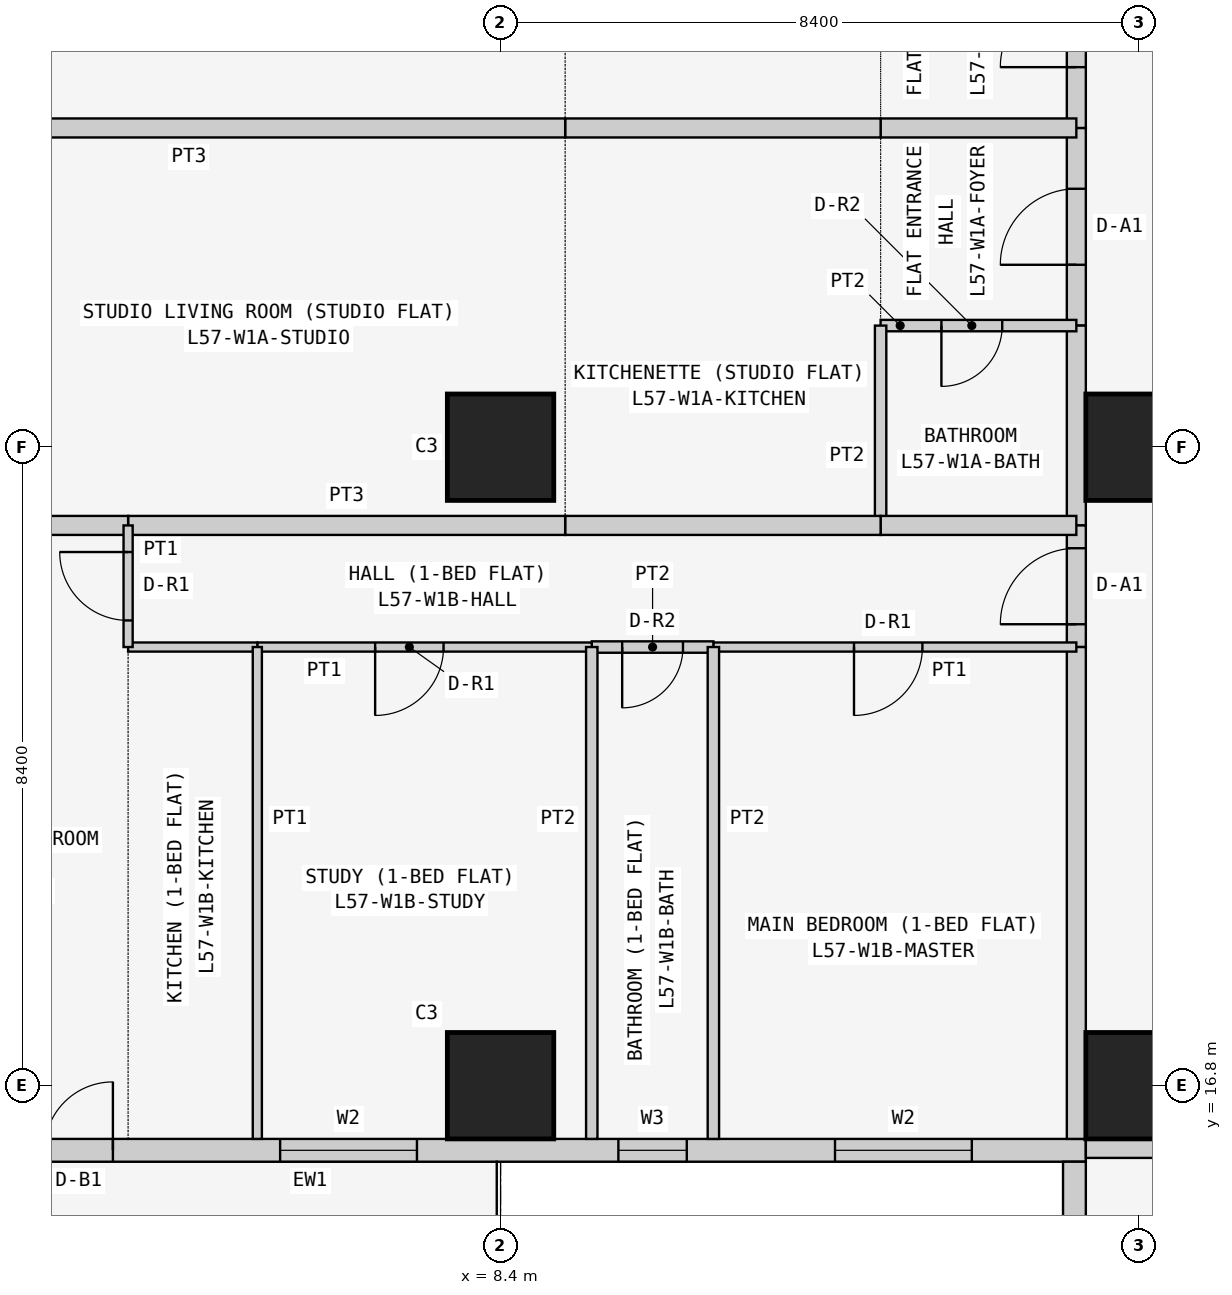
"""IFC4 building model, lengths in metres.
Left out: names, types, materials, properties, quantities, classifications, styles, units other than length and angle.
Written with IfcOpenShell. Run it as: python <this file> out.ifc"""

import sys

from ifc_helpers import new_model, si_unit, direction, frame, frame_2d, origin, origin_2d, place, context, subcontext, project, spatial, rectangle, extrude, element, fill, save


model = new_model("IFC4")
c1 = context("Model", 3, precision=1e-05, world=origin(), true_north=direction((0.0, 1.0)))
c2 = subcontext(c1, "Body", "Model", "MODEL_VIEW")
j1 = project(units=[si_unit("LENGTHUNIT", "METRE"), si_unit("PLANEANGLEUNIT", "RADIAN")], contexts=[c1])
p1 = place(None, origin())
s1 = spatial("IfcSite", under=j1, at=p1, CompositionType="ELEMENT")
p2 = place(p1, origin())
s2 = spatial("IfcBuilding", under=s1, at=p2, CompositionType="ELEMENT")
p3 = place(p2, frame((0.0, 0.0, 219.3)))
s3 = spatial("IfcBuildingStorey", under=s2, at=p3, CompositionType="ELEMENT", Elevation=219.3)
for number, where, z_axis, x_axis in (
    (1, (8.4, 16.8, 0.0), (0.0, 0.0, 1.0), (1.0, 0.0, 0.0)),
    (2, (8.4, 25.2, 0.0), (0.0, 0.0, 1.0), (1.0, 0.0, 0.0)),
    (3, (16.8, 16.8, 0.0), (0.0, 0.0, 1.0), (1.0, 0.0, 0.0)),
    (4, (16.8, 25.2, 0.0), (0.0, 0.0, 1.0), (1.0, 0.0, 0.0)),
):
    element("IfcColumn", number, at=place(p3, frame(where, z_axis=z_axis, x_axis=x_axis)), inside=s3, PredefinedType="COLUMN", context=c2, shape_type="SweptSolid", body=[
        extrude(rectangle(XDim=1.4, YDim=1.4, at=origin_2d()), origin(), (0.0, 0.0, 1.0), 3.6),
    ])
p4 = place(p3, frame((0.4, 15.95, 0.0), z_axis=(0.0, 0.0, 1.0), x_axis=(1.0, 0.0, 0.0)))
e5 = element("IfcWall", 5, at=p4, inside=s3, PredefinedType="SOLIDWALL", context=c2, shape_type="SweptSolid", body=[
    extrude(rectangle(XDim=15.7, YDim=0.3, at=frame_2d((7.85, 0.0))), origin(), (0.0, 0.0, 1.0), 3.45),
])
p5 = place(p4, frame((12.4, 0.0, 0.9)))
e6 = element("IfcOpeningElement", 6, at=p5, cuts=e5, PredefinedType="OPENING", context=c2, shape_type="SweptSolid", body=[
    extrude(rectangle(XDim=1.8, YDim=1.5, at=frame_2d((0.9, 0.75))), frame((0.0, 0.16, 0.0), z_axis=(0.0, -1.0, 0.0), x_axis=(1.0, 0.0, 0.0)), (0.0, 0.0, 1.0), 0.32),
])
p6 = place(p4, frame((9.55, 0.0, 1.5)))
e7 = element("IfcOpeningElement", 7, at=p6, cuts=e5, PredefinedType="OPENING", context=c2, shape_type="SweptSolid", body=[
    extrude(rectangle(XDim=0.9, YDim=0.7, at=frame_2d((0.45, 0.35))), frame((0.0, 0.16, 0.0), z_axis=(0.0, -1.0, 0.0), x_axis=(1.0, 0.0, 0.0)), (0.0, 0.0, 1.0), 0.32),
])
p7 = place(p4, frame((5.1, 0.0, 0.9)))
e8 = element("IfcOpeningElement", 8, at=p7, cuts=e5, PredefinedType="OPENING", context=c2, shape_type="SweptSolid", body=[
    extrude(rectangle(XDim=1.8, YDim=1.5, at=frame_2d((0.9, 0.75))), frame((0.0, 0.16, 0.0), z_axis=(0.0, -1.0, 0.0), x_axis=(1.0, 0.0, 0.0)), (0.0, 0.0, 1.0), 0.32),
])
p8 = place(p4, frame((2.0, 0.0, 0.0)))
e9 = element("IfcOpeningElement", 9, at=p8, cuts=e5, PredefinedType="OPENING", context=c2, shape_type="SweptSolid", body=[
    extrude(rectangle(XDim=0.9, YDim=2.4, at=frame_2d((0.45, 1.2))), frame((0.0, 0.16, 0.0), z_axis=(0.0, -1.0, 0.0), x_axis=(1.0, 0.0, 0.0)), (0.0, 0.0, 1.0), 0.32),
])
p9 = place(p4, frame((0.7, 0.0, 0.9)))
e10 = element("IfcOpeningElement", 10, at=p9, cuts=e5, PredefinedType="OPENING", context=c2, shape_type="SweptSolid", body=[
    extrude(rectangle(XDim=1.2, YDim=1.5, at=frame_2d((0.6, 0.75))), frame((0.0, 0.16, 0.0), z_axis=(0.0, -1.0, 0.0), x_axis=(1.0, 0.0, 0.0)), (0.0, 0.0, 1.0), 0.32),
])
p10 = place(p3, frame((15.95, 15.8, 0.0), z_axis=(0.0, 0.0, 1.0), x_axis=(0.0, -1.0, 0.0)))
e11 = element("IfcWall", 11, at=p10, inside=s3, PredefinedType="SOLIDWALL", context=c2, shape_type="SweptSolid", body=[
    extrude(rectangle(XDim=7.0, YDim=0.3, at=frame_2d((3.5, 0.0))), origin(), (0.0, 0.0, 1.0), 3.45),
])
p11 = place(p10, frame((1.5, 0.0, 0.9)))
e12 = element("IfcOpeningElement", 12, at=p11, cuts=e11, PredefinedType="OPENING", context=c2, shape_type="SweptSolid", body=[
    extrude(rectangle(XDim=2.4, YDim=1.5, at=frame_2d((1.2, 0.75))), frame((0.0, 0.16, 0.0), z_axis=(0.0, -1.0, 0.0), x_axis=(1.0, 0.0, 0.0)), (0.0, 0.0, 1.0), 0.32),
])
p12 = place(p10, frame((5.05, 0.0, 0.9)))
e13 = element("IfcOpeningElement", 13, at=p12, cuts=e11, PredefinedType="OPENING", context=c2, shape_type="SweptSolid", body=[
    extrude(rectangle(XDim=1.2, YDim=1.5, at=frame_2d((0.6, 0.75))), frame((0.0, 0.16, 0.0), z_axis=(0.0, -1.0, 0.0), x_axis=(1.0, 0.0, 0.0)), (0.0, 0.0, 1.0), 0.32),
])
p13 = place(p3, frame((22.971, 15.975, 0.0), z_axis=(0.0, 0.0, 1.0), x_axis=(-1.0, 0.0, 0.0)))
e14 = element("IfcWall", 14, at=p13, inside=s3, PredefinedType="PARTITIONING", context=c2, shape_type="SweptSolid", body=[
    extrude(rectangle(XDim=6.871, YDim=0.25, at=frame_2d((3.436, 0.0))), origin(), (0.0, 0.0, 1.0), 3.45),
])
p14 = place(p3, frame((15.975, 26.8, 0.0), z_axis=(0.0, 0.0, 1.0), x_axis=(0.0, 1.0, 0.0)))
e15 = element("IfcWall", 15, at=p14, inside=s3, PredefinedType="PARTITIONING", context=c2, shape_type="SweptSolid", body=[
    extrude(rectangle(XDim=2.6, YDim=0.25, at=frame_2d((1.3, 0.0))), origin(), (0.0, 0.0, 1.0), 3.45),
])
p15 = place(p14, frame((0.8, 0.0, 0.0)))
e16 = element("IfcOpeningElement", 16, at=p15, cuts=e15, PredefinedType="OPENING", context=c2, shape_type="SweptSolid", body=[
    extrude(rectangle(XDim=1.0, YDim=2.1, at=frame_2d((0.5, 1.05))), frame((0.0, 0.135, 0.0), z_axis=(0.0, -1.0, 0.0), x_axis=(1.0, 0.0, 0.0)), (0.0, 0.0, 1.0), 0.27),
])
p16 = place(p3, frame((15.975, 24.171, 0.0), z_axis=(0.0, 0.0, 1.0), x_axis=(0.0, 1.0, 0.0)))
e17 = element("IfcWall", 17, at=p16, inside=s3, PredefinedType="PARTITIONING", context=c2, shape_type="SweptSolid", body=[
    extrude(rectangle(XDim=2.629, YDim=0.25, at=frame_2d((1.314, 0.0))), origin(), (0.0, 0.0, 1.0), 3.45),
])
p17 = place(p3, frame((15.975, 22.571, 0.0), z_axis=(0.0, 0.0, 1.0), x_axis=(0.0, 1.0, 0.0)))
e18 = element("IfcWall", 18, at=p17, inside=s3, PredefinedType="PARTITIONING", context=c2, shape_type="SweptSolid", body=[
    extrude(rectangle(XDim=1.6, YDim=0.25, at=frame_2d((0.8, 0.0))), origin(), (0.0, 0.0, 1.0), 3.45),
])
p18 = place(p17, frame((0.3, 0.0, 0.0)))
e19 = element("IfcOpeningElement", 19, at=p18, cuts=e18, PredefinedType="OPENING", context=c2, shape_type="SweptSolid", body=[
    extrude(rectangle(XDim=1.0, YDim=2.1, at=frame_2d((0.5, 1.05))), frame((0.0, 0.135, 0.0), z_axis=(0.0, -1.0, 0.0), x_axis=(1.0, 0.0, 0.0)), (0.0, 0.0, 1.0), 0.27),
])
p19 = place(p3, frame((15.975, 16.1, 0.0), z_axis=(0.0, 0.0, 1.0), x_axis=(0.0, 1.0, 0.0)))
e20 = element("IfcWall", 20, at=p19, inside=s3, PredefinedType="PARTITIONING", context=c2, shape_type="SweptSolid", body=[
    extrude(rectangle(XDim=6.471, YDim=0.25, at=frame_2d((3.235, 0.0))), origin(), (0.0, 0.0, 1.0), 3.45),
])
p20 = place(p3, frame((15.975, 29.4, 0.0), z_axis=(0.0, 0.0, 1.0), x_axis=(0.0, 1.0, 0.0)))
e21 = element("IfcWall", 21, at=p20, inside=s3, PredefinedType="PARTITIONING", context=c2, shape_type="SweptSolid", body=[
    extrude(rectangle(XDim=2.6, YDim=0.25, at=frame_2d((1.3, 0.0))), origin(), (0.0, 0.0, 1.0), 3.45),
])
p21 = place(p20, frame((0.8, 0.0, 0.0)))
e22 = element("IfcOpeningElement", 22, at=p21, cuts=e21, PredefinedType="OPENING", context=c2, shape_type="SweptSolid", body=[
    extrude(rectangle(XDim=1.0, YDim=2.1, at=frame_2d((0.5, 1.05))), frame((0.0, 0.135, 0.0), z_axis=(0.0, -1.0, 0.0), x_axis=(1.0, 0.0, 0.0)), (0.0, 0.0, 1.0), 0.27),
])
p22 = place(p3, frame((13.4, 26.8, 0.0), z_axis=(0.0, 0.0, 1.0), x_axis=(1.0, 0.0, 0.0)))
e23 = element("IfcWall", 23, at=p22, inside=s3, PredefinedType="PARTITIONING", context=c2, shape_type="SweptSolid", body=[
    extrude(rectangle(XDim=2.575, YDim=0.15, at=frame_2d((1.288, 0.0))), origin(), (0.0, 0.0, 1.0), 3.45),
])
p23 = place(p22, frame((0.8, 0.0, 0.0)))
e24 = element("IfcOpeningElement", 24, at=p23, cuts=e23, PredefinedType="OPENING", context=c2, shape_type="SweptSolid", body=[
    extrude(rectangle(XDim=0.8, YDim=2.1, at=frame_2d((0.4, 1.05))), frame((0.0, 0.085, 0.0), z_axis=(0.0, -1.0, 0.0), x_axis=(1.0, 0.0, 0.0)), (0.0, 0.0, 1.0), 0.17),
])
p24 = place(p3, frame((15.975, 29.4, 0.0), z_axis=(0.0, 0.0, 1.0), x_axis=(-1.0, 0.0, 0.0)))
e25 = element("IfcWall", 25, at=p24, inside=s3, PredefinedType="PARTITIONING", context=c2, shape_type="SweptSolid", body=[
    extrude(rectangle(XDim=2.575, YDim=0.25, at=frame_2d((1.288, 0.0))), origin(), (0.0, 0.0, 1.0), 3.45),
])
p25 = place(p3, frame((13.4, 26.8, 0.0), z_axis=(0.0, 0.0, 1.0), x_axis=(0.0, -1.0, 0.0)))
e26 = element("IfcWall", 26, at=p25, inside=s3, PredefinedType="PARTITIONING", context=c2, shape_type="SweptSolid", body=[
    extrude(rectangle(XDim=2.629, YDim=0.15, at=frame_2d((1.314, 0.0))), origin(), (0.0, 0.0, 1.0), 3.45),
])
p26 = place(p3, frame((13.4, 24.171, 0.0), z_axis=(0.0, 0.0, 1.0), x_axis=(1.0, 0.0, 0.0)))
e27 = element("IfcWall", 27, at=p26, inside=s3, PredefinedType="PARTITIONING", context=c2, shape_type="SweptSolid", body=[
    extrude(rectangle(XDim=2.575, YDim=0.25, at=frame_2d((1.288, 0.0))), origin(), (0.0, 0.0, 1.0), 3.45),
])
for number, where, z_axis, x_axis in (
    (28, (9.25, 24.171, 0.0), (0.0, 0.0, 1.0), (1.0, 0.0, 0.0)),
    (29, (13.4, 29.4, 0.0), (0.0, 0.0, 1.0), (-1.0, 0.0, 0.0)),
):
    element("IfcWall", number, at=place(p3, frame(where, z_axis=z_axis, x_axis=x_axis)), inside=s3, PredefinedType="PARTITIONING", context=c2, shape_type="SweptSolid", body=[
        extrude(rectangle(XDim=4.15, YDim=0.25, at=frame_2d((2.075, 0.0))), origin(), (0.0, 0.0, 1.0), 3.45),
    ])
p27 = place(p3, frame((3.5, 24.171, 0.0), z_axis=(0.0, 0.0, 1.0), x_axis=(1.0, 0.0, 0.0)))
e30 = element("IfcWall", 30, at=p27, inside=s3, PredefinedType="PARTITIONING", context=c2, shape_type="SweptSolid", body=[
    extrude(rectangle(XDim=5.75, YDim=0.25, at=frame_2d((2.875, 0.0))), origin(), (0.0, 0.0, 1.0), 3.45),
])
p28 = place(p3, frame((-0.65, 24.171, 0.0), z_axis=(0.0, 0.0, 1.0), x_axis=(1.0, 0.0, 0.0)))
e31 = element("IfcWall", 31, at=p28, inside=s3, PredefinedType="PARTITIONING", context=c2, shape_type="SweptSolid", body=[
    extrude(rectangle(XDim=4.15, YDim=0.25, at=frame_2d((2.075, 0.0))), origin(), (0.0, 0.0, 1.0), 3.45),
])
p29 = place(p3, frame((9.25, 29.4, 0.0), z_axis=(0.0, 0.0, 1.0), x_axis=(-1.0, 0.0, 0.0)))
e32 = element("IfcWall", 32, at=p29, inside=s3, PredefinedType="PARTITIONING", context=c2, shape_type="SweptSolid", body=[
    extrude(rectangle(XDim=9.9, YDim=0.25, at=frame_2d((4.95, 0.0))), origin(), (0.0, 0.0, 1.0), 3.45),
])
p30 = place(p3, frame((11.2, 22.571, 0.0), z_axis=(0.0, 0.0, 1.0), x_axis=(1.0, 0.0, 0.0)))
e33 = element("IfcWall", 33, at=p30, inside=s3, PredefinedType="PARTITIONING", context=c2, shape_type="SweptSolid", body=[
    extrude(rectangle(XDim=4.775, YDim=0.12, at=frame_2d((2.388, 0.0))), origin(), (0.0, 0.0, 1.0), 3.45),
])
p31 = place(p30, frame((1.85, 0.0, 0.0)))
e34 = element("IfcOpeningElement", 34, at=p31, cuts=e33, PredefinedType="OPENING", context=c2, shape_type="SweptSolid", body=[
    extrude(rectangle(XDim=0.9, YDim=2.1, at=frame_2d((0.45, 1.05))), frame((0.0, 0.07, 0.0), z_axis=(0.0, -1.0, 0.0), x_axis=(1.0, 0.0, 0.0)), (0.0, 0.0, 1.0), 0.14),
])
p32 = place(p3, frame((9.6, 22.571, 0.0), z_axis=(0.0, 0.0, 1.0), x_axis=(1.0, 0.0, 0.0)))
e35 = element("IfcWall", 35, at=p32, inside=s3, PredefinedType="PARTITIONING", context=c2, shape_type="SweptSolid", body=[
    extrude(rectangle(XDim=1.6, YDim=0.15, at=frame_2d((0.8, 0.0))), origin(), (0.0, 0.0, 1.0), 3.45),
])
p33 = place(p32, frame((0.4, 0.0, 0.0)))
e36 = element("IfcOpeningElement", 36, at=p33, cuts=e35, PredefinedType="OPENING", context=c2, shape_type="SweptSolid", body=[
    extrude(rectangle(XDim=0.8, YDim=2.1, at=frame_2d((0.4, 1.05))), frame((0.0, 0.085, 0.0), z_axis=(0.0, -1.0, 0.0), x_axis=(1.0, 0.0, 0.0)), (0.0, 0.0, 1.0), 0.17),
])
p34 = place(p3, frame((5.2, 22.571, 0.0), z_axis=(0.0, 0.0, 1.0), x_axis=(1.0, 0.0, 0.0)))
e37 = element("IfcWall", 37, at=p34, inside=s3, PredefinedType="PARTITIONING", context=c2, shape_type="SweptSolid", body=[
    extrude(rectangle(XDim=4.4, YDim=0.12, at=frame_2d((2.2, 0.0))), origin(), (0.0, 0.0, 1.0), 3.45),
])
p35 = place(p34, frame((1.55, 0.0, 0.0)))
e38 = element("IfcOpeningElement", 38, at=p35, cuts=e37, PredefinedType="OPENING", context=c2, shape_type="SweptSolid", body=[
    extrude(rectangle(XDim=0.9, YDim=2.1, at=frame_2d((0.45, 1.05))), frame((0.0, 0.07, 0.0), z_axis=(0.0, -1.0, 0.0), x_axis=(1.0, 0.0, 0.0)), (0.0, 0.0, 1.0), 0.14),
])
p36 = place(p3, frame((3.5, 22.571, 0.0), z_axis=(0.0, 0.0, 1.0), x_axis=(1.0, 0.0, 0.0)))
e39 = element("IfcWall", 39, at=p36, inside=s3, PredefinedType="PARTITIONING", context=c2, shape_type="SweptSolid", body=[
    extrude(rectangle(XDim=1.7, YDim=0.12, at=frame_2d((0.85, 0.0))), origin(), (0.0, 0.0, 1.0), 3.45),
])
p37 = place(p3, frame((3.5, 24.171, 0.0), z_axis=(0.0, 0.0, 1.0), x_axis=(0.0, -1.0, 0.0)))
e40 = element("IfcWall", 40, at=p37, inside=s3, PredefinedType="PARTITIONING", context=c2, shape_type="SweptSolid", body=[
    extrude(rectangle(XDim=1.6, YDim=0.12, at=frame_2d((0.8, 0.0))), origin(), (0.0, 0.0, 1.0), 3.45),
])
p38 = place(p37, frame((0.35, 0.0, 0.0)))
e41 = element("IfcOpeningElement", 41, at=p38, cuts=e40, PredefinedType="OPENING", context=c2, shape_type="SweptSolid", body=[
    extrude(rectangle(XDim=0.9, YDim=2.1, at=frame_2d((0.45, 1.05))), frame((0.0, 0.07, 0.0), z_axis=(0.0, -1.0, 0.0), x_axis=(1.0, 0.0, 0.0)), (0.0, 0.0, 1.0), 0.14),
])
for number, where, z_axis, x_axis in (
    (42, (11.2, 22.571, 0.0), (0.0, 0.0, 1.0), (0.0, -1.0, 0.0)),
    (43, (9.6, 22.571, 0.0), (0.0, 0.0, 1.0), (0.0, -1.0, 0.0)),
):
    element("IfcWall", number, at=place(p3, frame(where, z_axis=z_axis, x_axis=x_axis)), inside=s3, PredefinedType="PARTITIONING", context=c2, shape_type="SweptSolid", body=[
        extrude(rectangle(XDim=6.471, YDim=0.15, at=frame_2d((3.235, 0.0))), origin(), (0.0, 0.0, 1.0), 3.45),
    ])
p39 = place(p3, frame((5.2, 22.571, 0.0), z_axis=(0.0, 0.0, 1.0), x_axis=(0.0, -1.0, 0.0)))
e44 = element("IfcWall", 44, at=p39, inside=s3, PredefinedType="PARTITIONING", context=c2, shape_type="SweptSolid", body=[
    extrude(rectangle(XDim=6.471, YDim=0.12, at=frame_2d((3.235, 0.0))), origin(), (0.0, 0.0, 1.0), 3.45),
])
p40 = place(p5, origin())
e45 = element("IfcWindow", 45, at=p40, inside=s3, PartitioningType="SINGLE_PANEL", PredefinedType="WINDOW", context=c2, shape_type="SweptSolid", body=[
    extrude(rectangle(XDim=1.8, YDim=1.5, at=frame_2d((0.9, 0.75))), frame((0.0, 0.03, 0.0), z_axis=(0.0, -1.0, 0.0), x_axis=(1.0, 0.0, 0.0)), (0.0, 0.0, 1.0), 0.06),
])
fill(e6, e45)
p41 = place(p6, origin())
e46 = element("IfcWindow", 46, at=p41, inside=s3, PartitioningType="SINGLE_PANEL", PredefinedType="WINDOW", context=c2, shape_type="SweptSolid", body=[
    extrude(rectangle(XDim=0.9, YDim=0.7, at=frame_2d((0.45, 0.35))), frame((0.0, 0.03, 0.0), z_axis=(0.0, -1.0, 0.0), x_axis=(1.0, 0.0, 0.0)), (0.0, 0.0, 1.0), 0.06),
])
fill(e7, e46)
p42 = place(p7, origin())
e47 = element("IfcWindow", 47, at=p42, inside=s3, PartitioningType="SINGLE_PANEL", PredefinedType="WINDOW", context=c2, shape_type="SweptSolid", body=[
    extrude(rectangle(XDim=1.8, YDim=1.5, at=frame_2d((0.9, 0.75))), frame((0.0, 0.03, 0.0), z_axis=(0.0, -1.0, 0.0), x_axis=(1.0, 0.0, 0.0)), (0.0, 0.0, 1.0), 0.06),
])
fill(e8, e47)
p43 = place(p8, origin())
e48 = element("IfcDoor", 48, at=p43, inside=s3, OperationType="SINGLE_SWING_RIGHT", PredefinedType="DOOR", context=c2, shape_type="SweptSolid", body=[
    extrude(rectangle(XDim=0.9, YDim=2.4, at=frame_2d((0.45, 1.2))), frame((0.0, 0.025, 0.0), z_axis=(0.0, -1.0, 0.0), x_axis=(1.0, 0.0, 0.0)), (0.0, 0.0, 1.0), 0.05),
])
fill(e9, e48)
p44 = place(p15, origin())
e49 = element("IfcDoor", 49, at=p44, inside=s3, OperationType="SINGLE_SWING_LEFT", PredefinedType="DOOR", context=c2, shape_type="SweptSolid", body=[
    extrude(rectangle(XDim=1.0, YDim=2.1, at=frame_2d((0.5, 1.05))), frame((0.0, 0.025, 0.0), z_axis=(0.0, -1.0, 0.0), x_axis=(1.0, 0.0, 0.0)), (0.0, 0.0, 1.0), 0.05),
])
fill(e16, e49)
p45 = place(p23, frame((0.8, 0.0, 0.0), z_axis=(0.0, 0.0, 1.0), x_axis=(-1.0, 0.0, 0.0)))
e50 = element("IfcDoor", 50, at=p45, inside=s3, OperationType="SINGLE_SWING_RIGHT", PredefinedType="DOOR", context=c2, shape_type="SweptSolid", body=[
    extrude(rectangle(XDim=0.8, YDim=2.1, at=frame_2d((0.4, 1.05))), frame((0.0, 0.025, 0.0), z_axis=(0.0, -1.0, 0.0), x_axis=(1.0, 0.0, 0.0)), (0.0, 0.0, 1.0), 0.05),
])
fill(e24, e50)
p46 = place(p18, origin())
e51 = element("IfcDoor", 51, at=p46, inside=s3, OperationType="SINGLE_SWING_LEFT", PredefinedType="DOOR", context=c2, shape_type="SweptSolid", body=[
    extrude(rectangle(XDim=1.0, YDim=2.1, at=frame_2d((0.5, 1.05))), frame((0.0, 0.025, 0.0), z_axis=(0.0, -1.0, 0.0), x_axis=(1.0, 0.0, 0.0)), (0.0, 0.0, 1.0), 0.05),
])
fill(e19, e51)
p47 = place(p31, frame((0.9, 0.0, 0.0), z_axis=(0.0, 0.0, 1.0), x_axis=(-1.0, 0.0, 0.0)))
e52 = element("IfcDoor", 52, at=p47, inside=s3, OperationType="SINGLE_SWING_RIGHT", PredefinedType="DOOR", context=c2, shape_type="SweptSolid", body=[
    extrude(rectangle(XDim=0.9, YDim=2.1, at=frame_2d((0.45, 1.05))), frame((0.0, 0.025, 0.0), z_axis=(0.0, -1.0, 0.0), x_axis=(1.0, 0.0, 0.0)), (0.0, 0.0, 1.0), 0.05),
])
fill(e34, e52)
p48 = place(p33, frame((0.8, 0.0, 0.0), z_axis=(0.0, 0.0, 1.0), x_axis=(-1.0, 0.0, 0.0)))
e53 = element("IfcDoor", 53, at=p48, inside=s3, OperationType="SINGLE_SWING_RIGHT", PredefinedType="DOOR", context=c2, shape_type="SweptSolid", body=[
    extrude(rectangle(XDim=0.8, YDim=2.1, at=frame_2d((0.4, 1.05))), frame((0.0, 0.025, 0.0), z_axis=(0.0, -1.0, 0.0), x_axis=(1.0, 0.0, 0.0)), (0.0, 0.0, 1.0), 0.05),
])
fill(e36, e53)
p49 = place(p35, frame((0.9, 0.0, 0.0), z_axis=(0.0, 0.0, 1.0), x_axis=(-1.0, 0.0, 0.0)))
e54 = element("IfcDoor", 54, at=p49, inside=s3, OperationType="SINGLE_SWING_RIGHT", PredefinedType="DOOR", context=c2, shape_type="SweptSolid", body=[
    extrude(rectangle(XDim=0.9, YDim=2.1, at=frame_2d((0.45, 1.05))), frame((0.0, 0.025, 0.0), z_axis=(0.0, -1.0, 0.0), x_axis=(1.0, 0.0, 0.0)), (0.0, 0.0, 1.0), 0.05),
])
fill(e38, e54)
p50 = place(p38, frame((0.9, 0.0, 0.0), z_axis=(0.0, 0.0, 1.0), x_axis=(-1.0, 0.0, 0.0)))
e55 = element("IfcDoor", 55, at=p50, inside=s3, OperationType="SINGLE_SWING_RIGHT", PredefinedType="DOOR", context=c2, shape_type="SweptSolid", body=[
    extrude(rectangle(XDim=0.9, YDim=2.1, at=frame_2d((0.45, 1.05))), frame((0.0, 0.025, 0.0), z_axis=(0.0, -1.0, 0.0), x_axis=(1.0, 0.0, 0.0)), (0.0, 0.0, 1.0), 0.05),
])
fill(e41, e55)
p51 = place(p21, origin())
e56 = element("IfcDoor", 56, at=p51, inside=s3, OperationType="SINGLE_SWING_LEFT", PredefinedType="DOOR", context=c2, shape_type="SweptSolid", body=[
    extrude(rectangle(XDim=1.0, YDim=2.1, at=frame_2d((0.5, 1.05))), frame((0.0, 0.025, 0.0), z_axis=(0.0, -1.0, 0.0), x_axis=(1.0, 0.0, 0.0)), (0.0, 0.0, 1.0), 0.05),
])
fill(e22, e56)
save(model, sys.argv[1])
